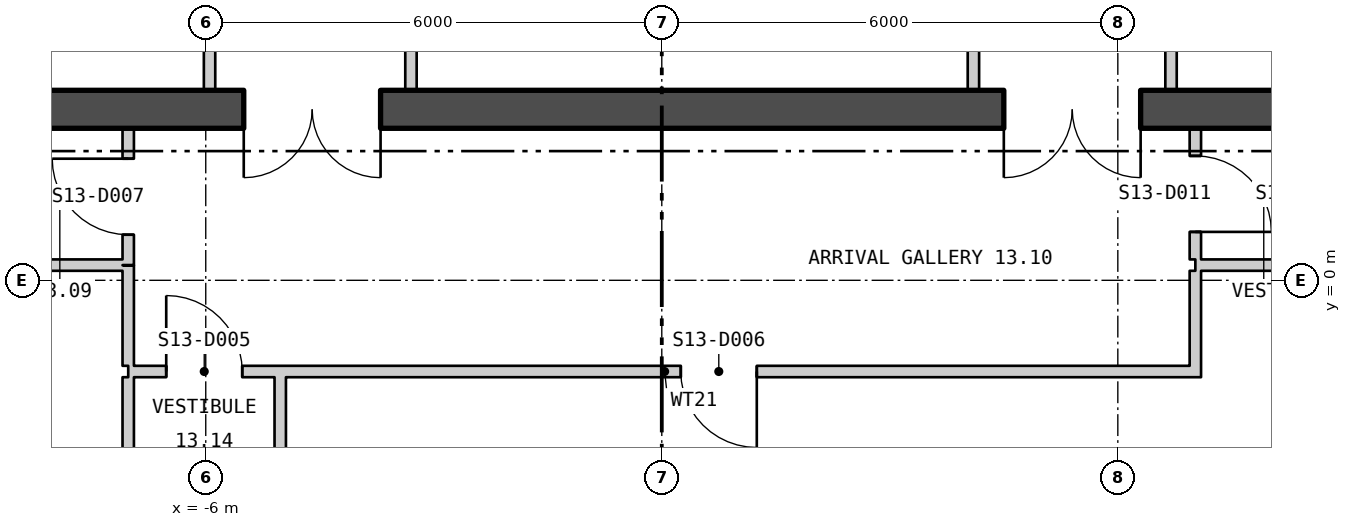
"""IFC4 building model, lengths in metres.
Left out: names, types, materials, properties, quantities, classifications, styles, units other than length and angle.
Written with IfcOpenShell. Run it as: python <this file> out.ifc"""

import sys

from ifc_helpers import new_model, si_unit, direction, frame, frame_2d, origin, place, context, subcontext, project, spatial, polyline, rectangle, outline, extrude, element, fill, save


model = new_model("IFC4")
c1 = context("Model", 3, precision=1e-05, world=origin(), true_north=direction((0.0, 1.0)))
c2 = subcontext(c1, "Body", "Model", "MODEL_VIEW")
j1 = project(units=[si_unit("LENGTHUNIT", "METRE"), si_unit("PLANEANGLEUNIT", "RADIAN")], contexts=[c1])
p1 = place(None, origin())
s1 = spatial("IfcSite", under=j1, at=p1, CompositionType="ELEMENT")
p2 = place(p1, origin())
s2 = spatial("IfcBuilding", under=s1, at=p2, CompositionType="ELEMENT")
p3 = place(p2, frame((0.0, 0.0, 174.9)))
s3 = spatial("IfcBuildingStorey", under=s2, at=p3, CompositionType="ELEMENT", Elevation=174.9)
p4 = place(p3, frame((-26.775, 13.22, -0.18), z_axis=(0.0, 0.0, 1.0), x_axis=(0.500000335318, -0.866025210188, 0.0)))
e1 = element("IfcWall", 1, at=p4, inside=s3, PredefinedType="SOLIDWALL", context=c2, shape_type="SweptSolid", body=[
    extrude(outline(polyline([(-0.13, -0.225), (45.88, -0.225), (45.62, 0.225), (0.13, 0.225), (-0.13, -0.225)])), origin(), (0.0, 0.0, 1.0), 3.68),
])
p5 = place(p4, frame((1.425, 0.0, 1.08)))
e2 = element("IfcOpeningElement", 2, at=p5, cuts=e1, PredefinedType="OPENING", context=c2, shape_type="SweptSolid", body=[
    extrude(rectangle(XDim=2.4, YDim=2.0, at=frame_2d((1.2, 1.0))), frame((0.0, 0.235, 0.0), z_axis=(0.0, -1.0, 0.0), x_axis=(1.0, 0.0, 0.0)), (0.0, 0.0, 1.0), 0.47),
])
p6 = place(p4, frame((5.895, 0.0, 1.08)))
e3 = element("IfcOpeningElement", 3, at=p6, cuts=e1, PredefinedType="OPENING", context=c2, shape_type="SweptSolid", body=[
    extrude(rectangle(XDim=2.4, YDim=2.0, at=frame_2d((1.2, 1.0))), frame((0.0, 0.235, 0.0), z_axis=(0.0, -1.0, 0.0), x_axis=(1.0, 0.0, 0.0)), (0.0, 0.0, 1.0), 0.47),
])
p7 = place(p4, frame((10.403, 0.0, 1.08)))
e4 = element("IfcOpeningElement", 4, at=p7, cuts=e1, PredefinedType="OPENING", context=c2, shape_type="SweptSolid", body=[
    extrude(rectangle(XDim=2.4, YDim=2.0, at=frame_2d((1.2, 1.0))), frame((0.0, 0.235, 0.0), z_axis=(0.0, -1.0, 0.0), x_axis=(1.0, 0.0, 0.0)), (0.0, 0.0, 1.0), 0.47),
])
p8 = place(p4, frame((14.912, 0.0, 1.08)))
e5 = element("IfcOpeningElement", 5, at=p8, cuts=e1, PredefinedType="OPENING", context=c2, shape_type="SweptSolid", body=[
    extrude(rectangle(XDim=2.4, YDim=2.0, at=frame_2d((1.2, 1.0))), frame((0.0, 0.235, 0.0), z_axis=(0.0, -1.0, 0.0), x_axis=(1.0, 0.0, 0.0)), (0.0, 0.0, 1.0), 0.47),
])
p9 = place(p4, frame((19.421, 0.0, 1.08)))
e6 = element("IfcOpeningElement", 6, at=p9, cuts=e1, PredefinedType="OPENING", context=c2, shape_type="SweptSolid", body=[
    extrude(rectangle(XDim=2.4, YDim=2.0, at=frame_2d((1.2, 1.0))), frame((0.0, 0.235, 0.0), z_axis=(0.0, -1.0, 0.0), x_axis=(1.0, 0.0, 0.0)), (0.0, 0.0, 1.0), 0.47),
])
p10 = place(p4, frame((23.929, 0.0, 1.08)))
e7 = element("IfcOpeningElement", 7, at=p10, cuts=e1, PredefinedType="OPENING", context=c2, shape_type="SweptSolid", body=[
    extrude(rectangle(XDim=2.4, YDim=2.0, at=frame_2d((1.2, 1.0))), frame((0.0, 0.235, 0.0), z_axis=(0.0, -1.0, 0.0), x_axis=(1.0, 0.0, 0.0)), (0.0, 0.0, 1.0), 0.47),
])
p11 = place(p4, frame((28.438, 0.0, 1.08)))
e8 = element("IfcOpeningElement", 8, at=p11, cuts=e1, PredefinedType="OPENING", context=c2, shape_type="SweptSolid", body=[
    extrude(rectangle(XDim=2.4, YDim=2.0, at=frame_2d((1.2, 1.0))), frame((0.0, 0.235, 0.0), z_axis=(0.0, -1.0, 0.0), x_axis=(1.0, 0.0, 0.0)), (0.0, 0.0, 1.0), 0.47),
])
p12 = place(p4, frame((32.947, 0.0, 1.08)))
e9 = element("IfcOpeningElement", 9, at=p12, cuts=e1, PredefinedType="OPENING", context=c2, shape_type="SweptSolid", body=[
    extrude(rectangle(XDim=2.4, YDim=2.0, at=frame_2d((1.2, 1.0))), frame((0.0, 0.235, 0.0), z_axis=(0.0, -1.0, 0.0), x_axis=(1.0, 0.0, 0.0)), (0.0, 0.0, 1.0), 0.47),
])
p13 = place(p4, frame((37.455, 0.0, 1.08)))
e10 = element("IfcOpeningElement", 10, at=p13, cuts=e1, PredefinedType="OPENING", context=c2, shape_type="SweptSolid", body=[
    extrude(rectangle(XDim=2.4, YDim=2.0, at=frame_2d((1.2, 1.0))), frame((0.0, 0.235, 0.0), z_axis=(0.0, -1.0, 0.0), x_axis=(1.0, 0.0, 0.0)), (0.0, 0.0, 1.0), 0.47),
])
p14 = place(p4, frame((41.925, 0.0, 1.08)))
e11 = element("IfcOpeningElement", 11, at=p14, cuts=e1, PredefinedType="OPENING", context=c2, shape_type="SweptSolid", body=[
    extrude(rectangle(XDim=2.4, YDim=2.0, at=frame_2d((1.2, 1.0))), frame((0.0, 0.235, 0.0), z_axis=(0.0, -1.0, 0.0), x_axis=(1.0, 0.0, 0.0)), (0.0, 0.0, 1.0), 0.47),
])
p15 = place(p3, frame((3.9, -26.401, -0.18), z_axis=(0.0, 0.0, 1.0), x_axis=(0.500000335318, 0.866025210188, 0.0)))
e12 = element("IfcWall", 12, at=p15, inside=s3, PredefinedType="SOLIDWALL", context=c2, shape_type="SweptSolid", body=[
    extrude(outline(polyline([(-0.13, -0.225), (45.88, -0.225), (45.62, 0.225), (0.13, 0.225), (-0.13, -0.225)])), origin(), (0.0, 0.0, 1.0), 3.68),
])
p16 = place(p15, frame((1.425, 0.0, 1.08)))
e13 = element("IfcOpeningElement", 13, at=p16, cuts=e12, PredefinedType="OPENING", context=c2, shape_type="SweptSolid", body=[
    extrude(rectangle(XDim=2.4, YDim=2.0, at=frame_2d((1.2, 1.0))), frame((0.0, 0.235, 0.0), z_axis=(0.0, -1.0, 0.0), x_axis=(1.0, 0.0, 0.0)), (0.0, 0.0, 1.0), 0.47),
])
p17 = place(p15, frame((5.895, 0.0, 1.08)))
e14 = element("IfcOpeningElement", 14, at=p17, cuts=e12, PredefinedType="OPENING", context=c2, shape_type="SweptSolid", body=[
    extrude(rectangle(XDim=2.4, YDim=2.0, at=frame_2d((1.2, 1.0))), frame((0.0, 0.235, 0.0), z_axis=(0.0, -1.0, 0.0), x_axis=(1.0, 0.0, 0.0)), (0.0, 0.0, 1.0), 0.47),
])
p18 = place(p15, frame((10.403, 0.0, 1.08)))
e15 = element("IfcOpeningElement", 15, at=p18, cuts=e12, PredefinedType="OPENING", context=c2, shape_type="SweptSolid", body=[
    extrude(rectangle(XDim=2.4, YDim=2.0, at=frame_2d((1.2, 1.0))), frame((0.0, 0.235, 0.0), z_axis=(0.0, -1.0, 0.0), x_axis=(1.0, 0.0, 0.0)), (0.0, 0.0, 1.0), 0.47),
])
p19 = place(p15, frame((14.912, 0.0, 1.08)))
e16 = element("IfcOpeningElement", 16, at=p19, cuts=e12, PredefinedType="OPENING", context=c2, shape_type="SweptSolid", body=[
    extrude(rectangle(XDim=2.4, YDim=2.0, at=frame_2d((1.2, 1.0))), frame((0.0, 0.235, 0.0), z_axis=(0.0, -1.0, 0.0), x_axis=(1.0, 0.0, 0.0)), (0.0, 0.0, 1.0), 0.47),
])
p20 = place(p15, frame((19.421, 0.0, 1.08)))
e17 = element("IfcOpeningElement", 17, at=p20, cuts=e12, PredefinedType="OPENING", context=c2, shape_type="SweptSolid", body=[
    extrude(rectangle(XDim=2.4, YDim=2.0, at=frame_2d((1.2, 1.0))), frame((0.0, 0.235, 0.0), z_axis=(0.0, -1.0, 0.0), x_axis=(1.0, 0.0, 0.0)), (0.0, 0.0, 1.0), 0.47),
])
p21 = place(p15, frame((23.929, 0.0, 1.08)))
e18 = element("IfcOpeningElement", 18, at=p21, cuts=e12, PredefinedType="OPENING", context=c2, shape_type="SweptSolid", body=[
    extrude(rectangle(XDim=2.4, YDim=2.0, at=frame_2d((1.2, 1.0))), frame((0.0, 0.235, 0.0), z_axis=(0.0, -1.0, 0.0), x_axis=(1.0, 0.0, 0.0)), (0.0, 0.0, 1.0), 0.47),
])
p22 = place(p15, frame((37.455, 0.0, 1.08)))
e19 = element("IfcOpeningElement", 19, at=p22, cuts=e12, PredefinedType="OPENING", context=c2, shape_type="SweptSolid", body=[
    extrude(rectangle(XDim=2.4, YDim=2.0, at=frame_2d((1.2, 1.0))), frame((0.0, 0.235, 0.0), z_axis=(0.0, -1.0, 0.0), x_axis=(1.0, 0.0, 0.0)), (0.0, 0.0, 1.0), 0.47),
])
p23 = place(p15, frame((41.925, 0.0, 1.08)))
e20 = element("IfcOpeningElement", 20, at=p23, cuts=e12, PredefinedType="OPENING", context=c2, shape_type="SweptSolid", body=[
    extrude(rectangle(XDim=2.4, YDim=2.0, at=frame_2d((1.2, 1.0))), frame((0.0, 0.235, 0.0), z_axis=(0.0, -1.0, 0.0), x_axis=(1.0, 0.0, 0.0)), (0.0, 0.0, 1.0), 0.47),
])
p24 = place(p3, frame((-16.2, 2.25, 0.0), z_axis=(0.0, 0.0, 1.0), x_axis=(1.0, 0.0, 0.0)))
e21 = element("IfcWall", 21, at=p24, inside=s3, PredefinedType="SHEAR", context=c2, shape_type="SweptSolid", body=[
    extrude(rectangle(XDim=32.4, YDim=0.5, at=frame_2d((16.2, 0.0))), origin(), (0.0, 0.0, 1.0), 3.7),
])
p25 = place(p24, frame((10.7, 0.0, 0.0)))
e22 = element("IfcOpeningElement", 22, at=p25, cuts=e21, PredefinedType="OPENING", context=c2, shape_type="SweptSolid", body=[
    extrude(rectangle(XDim=1.8, YDim=2.4, at=frame_2d((0.9, 1.2))), frame((0.0, 0.26, 0.0), z_axis=(0.0, -1.0, 0.0), x_axis=(1.0, 0.0, 0.0)), (0.0, 0.0, 1.0), 0.52),
])
p26 = place(p24, frame((20.7, 0.0, 0.0)))
e23 = element("IfcOpeningElement", 23, at=p26, cuts=e21, PredefinedType="OPENING", context=c2, shape_type="SweptSolid", body=[
    extrude(rectangle(XDim=1.8, YDim=2.4, at=frame_2d((0.9, 1.2))), frame((0.0, 0.26, 0.0), z_axis=(0.0, -1.0, 0.0), x_axis=(1.0, 0.0, 0.0)), (0.0, 0.0, 1.0), 0.52),
])
for number, where, z_axis, x_axis in (
    (24, (-5.95, 2.5, 0.0), (0.0, 0.0, 1.0), (0.0, 1.0, 0.0)),
    (25, (-3.3, 2.5, 0.0), (0.0, 0.0, 1.0), (0.0, 1.0, 0.0)),
    (26, (4.1, 2.5, 0.0), (0.0, 0.0, 1.0), (0.0, 1.0, 0.0)),
    (27, (6.7, 2.5, 0.0), (0.0, 0.0, 1.0), (0.0, 1.0, 0.0)),
):
    element("IfcWall", number, at=place(p3, frame(where, z_axis=z_axis, x_axis=x_axis)), inside=s3, PredefinedType="PARTITIONING", context=c2, shape_type="SweptSolid", body=[
        extrude(rectangle(XDim=2.975, YDim=0.15, at=frame_2d((1.488, 0.0))), origin(), (0.0, 0.0, 1.0), 3.7),
    ])
p27 = place(p3, frame((-17.925, 0.2, 0.0), z_axis=(0.0, 0.0, 1.0), x_axis=(1.0, 0.0, 0.0)))
e28 = element("IfcWall", 28, at=p27, inside=s3, PredefinedType="PARTITIONING", context=c2, shape_type="SweptSolid", body=[
    extrude(rectangle(XDim=10.83, YDim=0.15, at=frame_2d((5.415, 0.0))), origin(), (0.0, 0.0, 1.0), 3.7),
])
p28 = place(p27, frame((0.312, 0.0, 0.0)))
e29 = element("IfcOpeningElement", 29, at=p28, cuts=e28, PredefinedType="OPENING", context=c2, shape_type="SweptSolid", body=[
    extrude(rectangle(XDim=1.0, YDim=2.1, at=frame_2d((0.5, 1.05))), frame((0.0, 0.085, 0.0), z_axis=(0.0, -1.0, 0.0), x_axis=(1.0, 0.0, 0.0)), (0.0, 0.0, 1.0), 0.17),
])
p29 = place(p3, frame((-7.02, -3.46, 0.0), z_axis=(0.0, 0.0, 1.0), x_axis=(0.0, 1.0, 0.0)))
e30 = element("IfcWall", 30, at=p29, inside=s3, PredefinedType="PARTITIONING", context=c2, shape_type="SweptSolid", body=[
    extrude(rectangle(XDim=2.185, YDim=0.15, at=frame_2d((1.093, 0.0))), origin(), (0.0, 0.0, 1.0), 3.7),
])
p30 = place(p3, frame((-7.02, -1.2, 0.0), z_axis=(0.0, 0.0, 1.0), x_axis=(1.0, 0.0, 0.0)))
e31 = element("IfcWall", 31, at=p30, inside=s3, PredefinedType="PARTITIONING", context=c2, shape_type="SweptSolid", body=[
    extrude(rectangle(XDim=14.115, YDim=0.15, at=frame_2d((7.058, 0.0))), origin(), (0.0, 0.0, 1.0), 3.7),
])
p31 = place(p30, frame((0.5, 0.0, 0.0)))
e32 = element("IfcOpeningElement", 32, at=p31, cuts=e31, PredefinedType="OPENING", context=c2, shape_type="SweptSolid", body=[
    extrude(rectangle(XDim=1.0, YDim=2.1, at=frame_2d((0.5, 1.05))), frame((0.0, 0.085, 0.0), z_axis=(0.0, -1.0, 0.0), x_axis=(1.0, 0.0, 0.0)), (0.0, 0.0, 1.0), 0.17),
])
p32 = place(p30, frame((7.27, 0.0, 0.0)))
e33 = element("IfcOpeningElement", 33, at=p32, cuts=e31, PredefinedType="OPENING", context=c2, shape_type="SweptSolid", body=[
    extrude(rectangle(XDim=1.0, YDim=2.1, at=frame_2d((0.5, 1.05))), frame((0.0, 0.085, 0.0), z_axis=(0.0, -1.0, 0.0), x_axis=(1.0, 0.0, 0.0)), (0.0, 0.0, 1.0), 0.17),
])
p33 = place(p3, frame((-7.02, -1.125, 0.0), z_axis=(0.0, 0.0, 1.0), x_axis=(0.0, 1.0, 0.0)))
e34 = element("IfcWall", 34, at=p33, inside=s3, PredefinedType="PARTITIONING", context=c2, shape_type="SweptSolid", body=[
    extrude(rectangle(XDim=1.323, YDim=0.15, at=frame_2d((0.661, 0.0))), origin(), (0.0, 0.0, 1.0), 3.7),
])
p34 = place(p3, frame((-7.02, 0.2, 0.0), z_axis=(0.0, 0.0, 1.0), x_axis=(0.0, 1.0, 0.0)))
e35 = element("IfcWall", 35, at=p34, inside=s3, PredefinedType="PARTITIONING", context=c2, shape_type="SweptSolid", body=[
    extrude(rectangle(XDim=1.8, YDim=0.15, at=frame_2d((0.9, 0.0))), origin(), (0.0, 0.0, 1.0), 3.7),
])
p35 = place(p34, frame((0.4, 0.0, 0.0)))
e36 = element("IfcOpeningElement", 36, at=p35, cuts=e35, PredefinedType="OPENING", context=c2, shape_type="SweptSolid", body=[
    extrude(rectangle(XDim=1.0, YDim=2.1, at=frame_2d((0.5, 1.05))), frame((0.0, 0.085, 0.0), z_axis=(0.0, -1.0, 0.0), x_axis=(1.0, 0.0, 0.0)), (0.0, 0.0, 1.0), 0.17),
])
p36 = place(p3, frame((-5.02, -3.48, 0.0), z_axis=(0.0, 0.0, 1.0), x_axis=(0.0, 1.0, 0.0)))
e37 = element("IfcWall", 37, at=p36, inside=s3, PredefinedType="PARTITIONING", context=c2, shape_type="SweptSolid", body=[
    extrude(rectangle(XDim=2.205, YDim=0.15, at=frame_2d((1.103, 0.0))), origin(), (0.0, 0.0, 1.0), 3.7),
])
p37 = place(p3, frame((7.02, -1.125, 0.0), z_axis=(0.0, 0.0, 1.0), x_axis=(0.0, 1.0, 0.0)))
e38 = element("IfcWall", 38, at=p37, inside=s3, PredefinedType="PARTITIONING", context=c2, shape_type="SweptSolid", body=[
    extrude(rectangle(XDim=1.25, YDim=0.15, at=frame_2d((0.625, 0.0))), origin(), (0.0, 0.0, 1.0), 3.7),
])
p38 = place(p3, frame((7.02, 0.2, 0.0), z_axis=(0.0, 0.0, 1.0), x_axis=(1.0, 0.0, 0.0)))
e39 = element("IfcWall", 39, at=p38, inside=s3, PredefinedType="PARTITIONING", context=c2, shape_type="SweptSolid", body=[
    extrude(rectangle(XDim=10.905, YDim=0.15, at=frame_2d((5.452, 0.0))), origin(), (0.0, 0.0, 1.0), 3.7),
])
p39 = place(p38, frame((7.891, 0.0, 0.0)))
e40 = element("IfcOpeningElement", 40, at=p39, cuts=e39, PredefinedType="OPENING", context=c2, shape_type="SweptSolid", body=[
    extrude(rectangle(XDim=1.0, YDim=2.1, at=frame_2d((0.5, 1.05))), frame((0.0, 0.085, 0.0), z_axis=(0.0, -1.0, 0.0), x_axis=(1.0, 0.0, 0.0)), (0.0, 0.0, 1.0), 0.17),
])
p40 = place(p3, frame((7.02, 0.275, 0.0), z_axis=(0.0, 0.0, 1.0), x_axis=(0.0, 1.0, 0.0)))
e41 = element("IfcWall", 41, at=p40, inside=s3, PredefinedType="PARTITIONING", context=c2, shape_type="SweptSolid", body=[
    extrude(rectangle(XDim=1.725, YDim=0.15, at=frame_2d((0.863, 0.0))), origin(), (0.0, 0.0, 1.0), 3.7),
])
p41 = place(p40, frame((0.362, 0.0, 0.0)))
e42 = element("IfcOpeningElement", 42, at=p41, cuts=e41, PredefinedType="OPENING", context=c2, shape_type="SweptSolid", body=[
    extrude(rectangle(XDim=1.0, YDim=2.1, at=frame_2d((0.5, 1.05))), frame((0.0, 0.085, 0.0), z_axis=(0.0, -1.0, 0.0), x_axis=(1.0, 0.0, 0.0)), (0.0, 0.0, 1.0), 0.17),
])
p42 = place(p25, origin())
e43 = element("IfcDoor", 43, at=p42, inside=s3, OperationType="DOUBLE_DOOR_SINGLE_SWING", PredefinedType="DOOR", context=c2, shape_type="SweptSolid", body=[
    extrude(rectangle(XDim=1.8, YDim=2.4, at=frame_2d((0.9, 1.2))), frame((0.0, 0.025, 0.0), z_axis=(0.0, -1.0, 0.0), x_axis=(1.0, 0.0, 0.0)), (0.0, 0.0, 1.0), 0.05),
])
fill(e22, e43)
p43 = place(p26, origin())
e44 = element("IfcDoor", 44, at=p43, inside=s3, OperationType="DOUBLE_DOOR_SINGLE_SWING", PredefinedType="DOOR", context=c2, shape_type="SweptSolid", body=[
    extrude(rectangle(XDim=1.8, YDim=2.4, at=frame_2d((0.9, 1.2))), frame((0.0, 0.025, 0.0), z_axis=(0.0, -1.0, 0.0), x_axis=(1.0, 0.0, 0.0)), (0.0, 0.0, 1.0), 0.05),
])
fill(e23, e44)
p44 = place(p31, origin())
e45 = element("IfcDoor", 45, at=p44, inside=s3, OperationType="SINGLE_SWING_RIGHT", PredefinedType="DOOR", context=c2, shape_type="SweptSolid", body=[
    extrude(rectangle(XDim=1.0, YDim=2.1, at=frame_2d((0.5, 1.05))), frame((0.0, 0.025, 0.0), z_axis=(0.0, -1.0, 0.0), x_axis=(1.0, 0.0, 0.0)), (0.0, 0.0, 1.0), 0.05),
])
fill(e32, e45)
p45 = place(p32, origin())
e46 = element("IfcDoor", 46, at=p45, inside=s3, OperationType="SINGLE_SWING_RIGHT", PredefinedType="DOOR", context=c2, shape_type="SweptSolid", body=[
    extrude(rectangle(XDim=1.0, YDim=2.1, at=frame_2d((0.5, 1.05))), frame((0.0, 0.025, 0.0), z_axis=(0.0, -1.0, 0.0), x_axis=(1.0, 0.0, 0.0)), (0.0, 0.0, 1.0), 0.05),
])
fill(e33, e46)
p46 = place(p35, origin())
e47 = element("IfcDoor", 47, at=p46, inside=s3, OperationType="SINGLE_SWING_LEFT", PredefinedType="DOOR", context=c2, shape_type="SweptSolid", body=[
    extrude(rectangle(XDim=1.0, YDim=2.1, at=frame_2d((0.5, 1.05))), frame((0.0, 0.025, 0.0), z_axis=(0.0, -1.0, 0.0), x_axis=(1.0, 0.0, 0.0)), (0.0, 0.0, 1.0), 0.05),
])
fill(e36, e47)
p47 = place(p41, origin())
e48 = element("IfcDoor", 48, at=p47, inside=s3, OperationType="SINGLE_SWING_LEFT", PredefinedType="DOOR", context=c2, shape_type="SweptSolid", body=[
    extrude(rectangle(XDim=1.0, YDim=2.1, at=frame_2d((0.5, 1.05))), frame((0.0, 0.025, 0.0), z_axis=(0.0, -1.0, 0.0), x_axis=(1.0, 0.0, 0.0)), (0.0, 0.0, 1.0), 0.05),
])
fill(e42, e48)
save(model, sys.argv[1])
